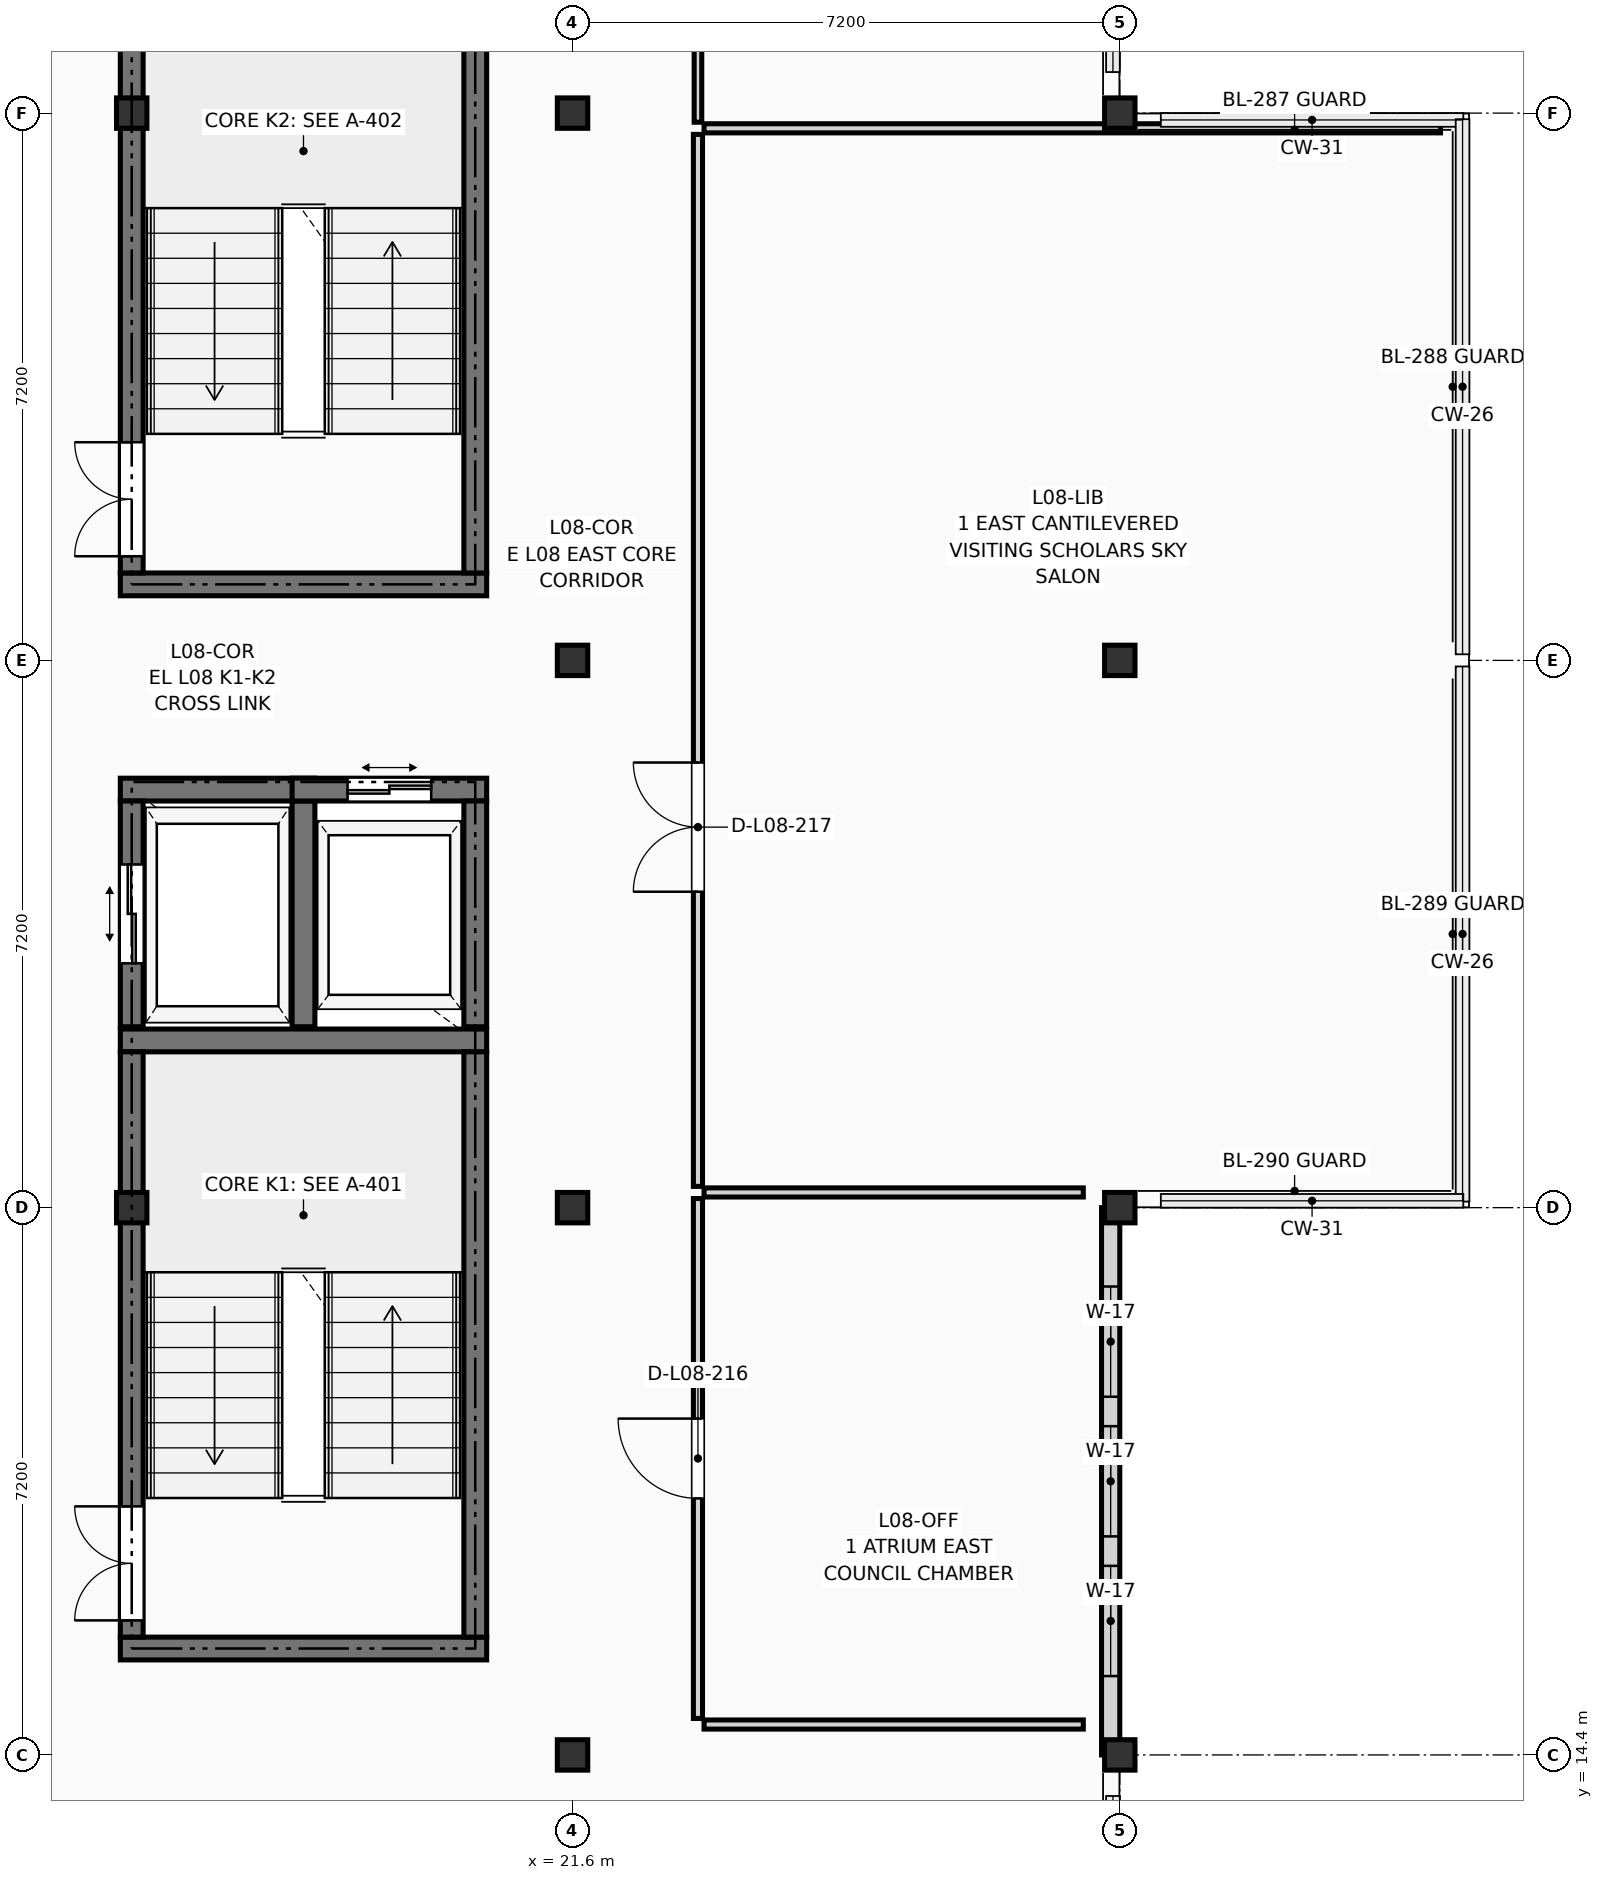
"""IFC4 building model, lengths in metres.
Left out: names, types, materials, properties, quantities, classifications, styles, units other than length and angle.
Written with IfcOpenShell. Run it as: python <this file> out.ifc"""

import sys

from ifc_helpers import new_model, si_unit, direction, frame, frame_2d, origin, origin_2d, place, context, subcontext, project, spatial, rectangle, extrude, element, fill, save


model = new_model("IFC4")
c1 = context("Model", 3, precision=1e-05, world=origin(), true_north=direction((0.0, 1.0)))
c2 = subcontext(c1, "Body", "Model", "MODEL_VIEW")
j1 = project(units=[si_unit("LENGTHUNIT", "METRE"), si_unit("PLANEANGLEUNIT", "RADIAN")], contexts=[c1])
p1 = place(None, origin())
s1 = spatial("IfcSite", under=j1, at=p1, CompositionType="ELEMENT")
p2 = place(p1, origin())
s2 = spatial("IfcBuilding", under=s1, at=p2, CompositionType="ELEMENT")
p3 = place(p2, frame((0.0, 0.0, 29.7)))
s3 = spatial("IfcBuildingStorey", under=s2, at=p3, CompositionType="ELEMENT", Elevation=29.7)
for number, where, z_axis, x_axis in (
    (1, (15.8, 21.6, 0.0), (0.0, 0.0, 1.0), (1.0, 0.0, 0.0)),
    (2, (15.8, 36.0, 0.0), (0.0, 0.0, 1.0), (1.0, 0.0, 0.0)),
    (3, (21.6, 14.4, 0.0), (0.0, 0.0, 1.0), (1.0, 0.0, 0.0)),
    (4, (21.6, 21.6, 0.0), (0.0, 0.0, 1.0), (1.0, 0.0, 0.0)),
    (5, (21.6, 28.8, 0.0), (0.0, 0.0, 1.0), (1.0, 0.0, 0.0)),
    (6, (21.6, 36.0, 0.0), (0.0, 0.0, 1.0), (1.0, 0.0, 0.0)),
    (7, (28.8, 14.4, 0.0), (0.0, 0.0, 1.0), (1.0, 0.0, 0.0)),
    (8, (28.8, 21.6, 0.0), (0.0, 0.0, 1.0), (1.0, 0.0, 0.0)),
    (9, (28.8, 28.8, 0.0), (0.0, 0.0, 1.0), (1.0, 0.0, 0.0)),
    (10, (28.8, 36.0, 0.0), (0.0, 0.0, 1.0), (1.0, 0.0, 0.0)),
):
    element("IfcColumn", number, at=place(p3, frame(where, z_axis=z_axis, x_axis=x_axis)), inside=s3, PredefinedType="COLUMN", context=c2, shape_type="SweptSolid", body=[
        extrude(rectangle(XDim=0.4, YDim=0.4, at=origin_2d()), origin(), (0.0, 0.0, 1.0), 3.6),
    ])
p4 = place(p3, frame((28.68, 14.4, 0.0), z_axis=(0.0, 0.0, 1.0), x_axis=(0.0, 1.0, 0.0)))
e11 = element("IfcWall", 11, at=p4, inside=s3, PredefinedType="SOLIDWALL", context=c2, shape_type="SweptSolid", body=[
    extrude(rectangle(XDim=7.2, YDim=0.24, at=frame_2d((3.6, 0.0))), origin(), (0.0, 0.0, 1.0), 2.85),
])
p5 = place(p4, frame((1.038, 0.0, 0.18)))
e12 = element("IfcOpeningElement", 12, at=p5, cuts=e11, PredefinedType="OPENING", context=c2, shape_type="SweptSolid", body=[
    extrude(rectangle(XDim=1.45, YDim=2.5, at=frame_2d((0.725, 1.25))), frame((0.0, 0.132, 0.0), z_axis=(0.0, -1.0, 0.0), x_axis=(1.0, 0.0, 0.0)), (0.0, 0.0, 1.0), 0.264),
])
p6 = place(p4, frame((2.875, 0.0, 0.18)))
e13 = element("IfcOpeningElement", 13, at=p6, cuts=e11, PredefinedType="OPENING", context=c2, shape_type="SweptSolid", body=[
    extrude(rectangle(XDim=1.45, YDim=2.5, at=frame_2d((0.725, 1.25))), frame((0.0, 0.132, 0.0), z_axis=(0.0, -1.0, 0.0), x_axis=(1.0, 0.0, 0.0)), (0.0, 0.0, 1.0), 0.264),
])
p7 = place(p4, frame((4.712, 0.0, 0.18)))
e14 = element("IfcOpeningElement", 14, at=p7, cuts=e11, PredefinedType="OPENING", context=c2, shape_type="SweptSolid", body=[
    extrude(rectangle(XDim=1.45, YDim=2.5, at=frame_2d((0.725, 1.25))), frame((0.0, 0.132, 0.0), z_axis=(0.0, -1.0, 0.0), x_axis=(1.0, 0.0, 0.0)), (0.0, 0.0, 1.0), 0.264),
])
for number, where, z_axis, x_axis in (
    (15, (15.65, 15.8, 0.0), (0.0, 0.0, 1.0), (1.0, 0.0, 0.0)),
    (16, (15.65, 23.8, 0.0), (0.0, 0.0, 1.0), (1.0, 0.0, 0.0)),
):
    element("IfcWall", number, at=place(p3, frame(where, z_axis=z_axis, x_axis=x_axis)), inside=s3, PredefinedType="SHEAR", context=c2, shape_type="SweptSolid", body=[
        extrude(rectangle(XDim=4.82, YDim=0.3, at=frame_2d((2.41, 0.0))), origin(), (0.0, 0.0, 1.0), 3.4),
    ])
p8 = place(p3, frame((15.8, 15.95, 0.0), z_axis=(0.0, 0.0, 1.0), x_axis=(0.0, 1.0, 0.0)))
e17 = element("IfcWall", 17, at=p8, inside=s3, PredefinedType="SHEAR", context=c2, shape_type="SweptSolid", body=[
    extrude(rectangle(XDim=7.7, YDim=0.3, at=frame_2d((3.85, 0.0))), origin(), (0.0, 0.0, 1.0), 3.4),
])
p9 = place(p8, frame((0.22, 0.0, 0.0)))
e18 = element("IfcOpeningElement", 18, at=p9, cuts=e17, PredefinedType="OPENING", context=c2, shape_type="SweptSolid", body=[
    extrude(rectangle(XDim=1.5, YDim=2.2, at=frame_2d((0.75, 1.1))), frame((0.0, 0.162, 0.0), z_axis=(0.0, -1.0, 0.0), x_axis=(1.0, 0.0, 0.0)), (0.0, 0.0, 1.0), 0.324),
])
p10 = place(p3, frame((20.32, 15.95, 0.0), z_axis=(0.0, 0.0, 1.0), x_axis=(0.0, 1.0, 0.0)))
e19 = element("IfcWall", 19, at=p10, inside=s3, PredefinedType="SHEAR", context=c2, shape_type="SweptSolid", body=[
    extrude(rectangle(XDim=7.7, YDim=0.3, at=frame_2d((3.85, 0.0))), origin(), (0.0, 0.0, 1.0), 3.4),
])
p11 = place(p3, frame((15.65, 29.8, 0.0), z_axis=(0.0, 0.0, 1.0), x_axis=(1.0, 0.0, 0.0)))
e20 = element("IfcWall", 20, at=p11, inside=s3, PredefinedType="SHEAR", context=c2, shape_type="SweptSolid", body=[
    extrude(rectangle(XDim=4.82, YDim=0.3, at=frame_2d((2.41, 0.0))), origin(), (0.0, 0.0, 1.0), 3.4),
])
p12 = place(p3, frame((15.8, 29.95, 0.0), z_axis=(0.0, 0.0, 1.0), x_axis=(0.0, 1.0, 0.0)))
e21 = element("IfcWall", 21, at=p12, inside=s3, PredefinedType="SHEAR", context=c2, shape_type="SweptSolid", body=[
    extrude(rectangle(XDim=7.7, YDim=0.3, at=frame_2d((3.85, 0.0))), origin(), (0.0, 0.0, 1.0), 3.4),
])
p13 = place(p12, frame((0.22, 0.0, 0.0)))
e22 = element("IfcOpeningElement", 22, at=p13, cuts=e21, PredefinedType="OPENING", context=c2, shape_type="SweptSolid", body=[
    extrude(rectangle(XDim=1.5, YDim=2.2, at=frame_2d((0.75, 1.1))), frame((0.0, 0.162, 0.0), z_axis=(0.0, -1.0, 0.0), x_axis=(1.0, 0.0, 0.0)), (0.0, 0.0, 1.0), 0.324),
])
p14 = place(p3, frame((20.32, 29.95, 0.0), z_axis=(0.0, 0.0, 1.0), x_axis=(0.0, 1.0, 0.0)))
e23 = element("IfcWall", 23, at=p14, inside=s3, PredefinedType="SHEAR", context=c2, shape_type="SweptSolid", body=[
    extrude(rectangle(XDim=7.7, YDim=0.3, at=frame_2d((3.85, 0.0))), origin(), (0.0, 0.0, 1.0), 3.4),
])
p15 = place(p3, frame((15.65, 27.1, 0.0), z_axis=(0.0, 0.0, 1.0), x_axis=(1.0, 0.0, 0.0)))
e24 = element("IfcWall", 24, at=p15, inside=s3, PredefinedType="SHEAR", context=c2, shape_type="SweptSolid", body=[
    extrude(rectangle(XDim=2.56, YDim=0.3, at=frame_2d((1.28, 0.0))), origin(), (0.0, 0.0, 1.0), 3.4),
])
p16 = place(p3, frame((15.8, 23.98, 0.0), z_axis=(0.0, 0.0, 1.0), x_axis=(0.0, 1.0, 0.0)))
e25 = element("IfcWall", 25, at=p16, inside=s3, PredefinedType="SHEAR", context=c2, shape_type="SweptSolid", body=[
    extrude(rectangle(XDim=2.97, YDim=0.3, at=frame_2d((1.485, 0.0))), origin(), (0.0, 0.0, 1.0), 3.4),
])
p17 = place(p16, frame((0.835, 0.0, 0.0)))
e26 = element("IfcOpeningElement", 26, at=p17, cuts=e25, PredefinedType="OPENING", context=c2, shape_type="SweptSolid", body=[
    extrude(rectangle(XDim=1.3, YDim=2.25, at=frame_2d((0.65, 1.125))), frame((0.0, 0.162, 0.0), z_axis=(0.0, -1.0, 0.0), x_axis=(1.0, 0.0, 0.0)), (0.0, 0.0, 1.0), 0.324),
])
p18 = place(p3, frame((18.06, 23.98, 0.0), z_axis=(0.0, 0.0, 1.0), x_axis=(0.0, 1.0, 0.0)))
e27 = element("IfcWall", 27, at=p18, inside=s3, PredefinedType="SHEAR", context=c2, shape_type="SweptSolid", body=[
    extrude(rectangle(XDim=2.97, YDim=0.3, at=frame_2d((1.485, 0.0))), origin(), (0.0, 0.0, 1.0), 3.4),
])
p19 = place(p3, frame((17.91, 27.1, 0.0), z_axis=(0.0, 0.0, 1.0), x_axis=(1.0, 0.0, 0.0)))
e28 = element("IfcWall", 28, at=p19, inside=s3, PredefinedType="SHEAR", context=c2, shape_type="SweptSolid", body=[
    extrude(rectangle(XDim=2.56, YDim=0.3, at=frame_2d((1.28, 0.0))), origin(), (0.0, 0.0, 1.0), 3.4),
])
p20 = place(p19, frame((0.73, 0.0, 0.0)))
e29 = element("IfcOpeningElement", 29, at=p20, cuts=e28, PredefinedType="OPENING", context=c2, shape_type="SweptSolid", body=[
    extrude(rectangle(XDim=1.1, YDim=2.2, at=frame_2d((0.55, 1.1))), frame((0.0, 0.162, 0.0), z_axis=(0.0, -1.0, 0.0), x_axis=(1.0, 0.0, 0.0)), (0.0, 0.0, 1.0), 0.324),
])
p21 = place(p3, frame((20.32, 23.98, 0.0), z_axis=(0.0, 0.0, 1.0), x_axis=(0.0, 1.0, 0.0)))
e30 = element("IfcWall", 30, at=p21, inside=s3, PredefinedType="SHEAR", context=c2, shape_type="SweptSolid", body=[
    extrude(rectangle(XDim=2.97, YDim=0.3, at=frame_2d((1.485, 0.0))), origin(), (0.0, 0.0, 1.0), 3.4),
])
p22 = place(p3, frame((23.25, 14.88, 0.0), z_axis=(0.0, 0.0, 1.0), x_axis=(0.0, 1.0, 0.0)))
e31 = element("IfcWall", 31, at=p22, inside=s3, PredefinedType="PARTITIONING", context=c2, shape_type="SweptSolid", body=[
    extrude(rectangle(XDim=6.84, YDim=0.12, at=frame_2d((3.42, 0.0))), origin(), (0.0, 0.0, 1.0), 3.385),
])
p23 = place(p22, frame((2.895, 0.0, 0.0)))
e32 = element("IfcOpeningElement", 32, at=p23, cuts=e31, PredefinedType="OPENING", context=c2, shape_type="SweptSolid", body=[
    extrude(rectangle(XDim=1.05, YDim=2.18, at=frame_2d((0.525, 1.09))), frame((0.0, 0.072, 0.0), z_axis=(0.0, -1.0, 0.0), x_axis=(1.0, 0.0, 0.0)), (0.0, 0.0, 1.0), 0.144),
])
p24 = place(p3, frame((23.33, 14.8, 0.0), z_axis=(0.0, 0.0, 1.0), x_axis=(1.0, 0.0, 0.0)))
e33 = element("IfcWall", 33, at=p24, inside=s3, PredefinedType="PARTITIONING", context=c2, shape_type="SweptSolid", body=[
    extrude(rectangle(XDim=4.99, YDim=0.12, at=frame_2d((2.495, 0.0))), origin(), (0.0, 0.0, 1.0), 3.385),
])
p25 = place(p3, frame((23.33, 21.8, 0.0), z_axis=(0.0, 0.0, 1.0), x_axis=(1.0, 0.0, 0.0)))
e34 = element("IfcWall", 34, at=p25, inside=s3, PredefinedType="PARTITIONING", context=c2, shape_type="SweptSolid", body=[
    extrude(rectangle(XDim=4.99, YDim=0.12, at=frame_2d((2.495, 0.0))), origin(), (0.0, 0.0, 1.0), 2.701),
])
p26 = place(p3, frame((23.25, 21.88, 0.0), z_axis=(0.0, 0.0, 1.0), x_axis=(0.0, 1.0, 0.0)))
e35 = element("IfcWall", 35, at=p26, inside=s3, PredefinedType="PARTITIONING", context=c2, shape_type="SweptSolid", body=[
    extrude(rectangle(XDim=13.84, YDim=0.12, at=frame_2d((6.92, 0.0))), origin(), (0.0, 0.0, 1.0), 3.385),
])
p27 = place(p26, frame((3.876, 0.0, 0.0)))
e36 = element("IfcOpeningElement", 36, at=p27, cuts=e35, PredefinedType="OPENING", context=c2, shape_type="SweptSolid", body=[
    extrude(rectangle(XDim=1.7, YDim=2.28, at=frame_2d((0.85, 1.14))), frame((0.0, 0.072, 0.0), z_axis=(0.0, -1.0, 0.0), x_axis=(1.0, 0.0, 0.0)), (0.0, 0.0, 1.0), 0.144),
])
p28 = place(p3, frame((23.33, 35.8, 0.0), z_axis=(0.0, 0.0, 1.0), x_axis=(1.0, 0.0, 0.0)))
e37 = element("IfcWall", 37, at=p28, inside=s3, PredefinedType="PARTITIONING", context=c2, shape_type="SweptSolid", body=[
    extrude(rectangle(XDim=9.69, YDim=0.12, at=frame_2d((4.845, 0.0))), origin(), (0.0, 0.0, 1.0), 2.701),
])
p29 = place(p3, frame((23.25, 35.88, 0.0), z_axis=(0.0, 0.0, 1.0), x_axis=(0.0, 1.0, 0.0)))
e38 = element("IfcWall", 38, at=p29, inside=s3, PredefinedType="PARTITIONING", context=c2, shape_type="SweptSolid", body=[
    extrude(rectangle(XDim=6.44, YDim=0.1, at=frame_2d((3.22, 0.0))), origin(), (0.0, 0.0, 1.0), 3.385),
])
p30 = place(p29, frame((2.77, 0.0, 0.0)))
e39 = element("IfcOpeningElement", 39, at=p30, cuts=e38, PredefinedType="OPENING", context=c2, shape_type="SweptSolid", body=[
    extrude(rectangle(XDim=0.9, YDim=2.1, at=frame_2d((0.45, 1.05))), frame((0.0, 0.062, 0.0), z_axis=(0.0, -1.0, 0.0), x_axis=(1.0, 0.0, 0.0)), (0.0, 0.0, 1.0), 0.124),
])
p31 = place(p5, origin())
e40 = element("IfcWindow", 40, at=p31, inside=s3, PartitioningType="SINGLE_PANEL", PredefinedType="WINDOW", context=c2, shape_type="SweptSolid", body=[
    extrude(rectangle(XDim=1.45, YDim=2.5, at=frame_2d((0.725, 1.25))), frame((0.0, 0.03, 0.0), z_axis=(0.0, -1.0, 0.0), x_axis=(1.0, 0.0, 0.0)), (0.0, 0.0, 1.0), 0.06),
])
fill(e12, e40)
p32 = place(p6, origin())
e41 = element("IfcWindow", 41, at=p32, inside=s3, PartitioningType="SINGLE_PANEL", PredefinedType="WINDOW", context=c2, shape_type="SweptSolid", body=[
    extrude(rectangle(XDim=1.45, YDim=2.5, at=frame_2d((0.725, 1.25))), frame((0.0, 0.03, 0.0), z_axis=(0.0, -1.0, 0.0), x_axis=(1.0, 0.0, 0.0)), (0.0, 0.0, 1.0), 0.06),
])
fill(e13, e41)
p33 = place(p7, origin())
e42 = element("IfcWindow", 42, at=p33, inside=s3, PartitioningType="SINGLE_PANEL", PredefinedType="WINDOW", context=c2, shape_type="SweptSolid", body=[
    extrude(rectangle(XDim=1.45, YDim=2.5, at=frame_2d((0.725, 1.25))), frame((0.0, 0.03, 0.0), z_axis=(0.0, -1.0, 0.0), x_axis=(1.0, 0.0, 0.0)), (0.0, 0.0, 1.0), 0.06),
])
fill(e14, e42)
p34 = place(p9, origin())
e43 = element("IfcDoor", 43, at=p34, inside=s3, OperationType="DOUBLE_DOOR_SINGLE_SWING", PredefinedType="DOOR", context=c2, shape_type="SweptSolid", body=[
    extrude(rectangle(XDim=1.5, YDim=2.2, at=frame_2d((0.75, 1.1))), frame((0.0, 0.025, 0.0), z_axis=(0.0, -1.0, 0.0), x_axis=(1.0, 0.0, 0.0)), (0.0, 0.0, 1.0), 0.05),
])
fill(e18, e43)
p35 = place(p13, origin())
e44 = element("IfcDoor", 44, at=p35, inside=s3, OperationType="DOUBLE_DOOR_SINGLE_SWING", PredefinedType="DOOR", context=c2, shape_type="SweptSolid", body=[
    extrude(rectangle(XDim=1.5, YDim=2.2, at=frame_2d((0.75, 1.1))), frame((0.0, 0.025, 0.0), z_axis=(0.0, -1.0, 0.0), x_axis=(1.0, 0.0, 0.0)), (0.0, 0.0, 1.0), 0.05),
])
fill(e22, e44)
p36 = place(p17, origin())
e45 = element("IfcDoor", 45, at=p36, inside=s3, OperationType="DOUBLE_DOOR_SLIDING", PredefinedType="DOOR", context=c2, shape_type="SweptSolid", body=[
    extrude(rectangle(XDim=1.3, YDim=2.25, at=frame_2d((0.65, 1.125))), frame((0.0, 0.025, 0.0), z_axis=(0.0, -1.0, 0.0), x_axis=(1.0, 0.0, 0.0)), (0.0, 0.0, 1.0), 0.05),
])
fill(e26, e45)
p37 = place(p20, origin())
e46 = element("IfcDoor", 46, at=p37, inside=s3, OperationType="DOUBLE_DOOR_SLIDING", PredefinedType="DOOR", context=c2, shape_type="SweptSolid", body=[
    extrude(rectangle(XDim=1.1, YDim=2.2, at=frame_2d((0.55, 1.1))), frame((0.0, 0.025, 0.0), z_axis=(0.0, -1.0, 0.0), x_axis=(1.0, 0.0, 0.0)), (0.0, 0.0, 1.0), 0.05),
])
fill(e29, e46)
p38 = place(p23, origin())
e47 = element("IfcDoor", 47, at=p38, inside=s3, OperationType="SINGLE_SWING_RIGHT", PredefinedType="DOOR", context=c2, shape_type="SweptSolid", body=[
    extrude(rectangle(XDim=1.05, YDim=2.18, at=frame_2d((0.525, 1.09))), frame((0.0, 0.025, 0.0), z_axis=(0.0, -1.0, 0.0), x_axis=(1.0, 0.0, 0.0)), (0.0, 0.0, 1.0), 0.05),
])
fill(e32, e47)
p39 = place(p27, origin())
e48 = element("IfcDoor", 48, at=p39, inside=s3, OperationType="DOUBLE_DOOR_SINGLE_SWING", PredefinedType="DOOR", context=c2, shape_type="SweptSolid", body=[
    extrude(rectangle(XDim=1.7, YDim=2.28, at=frame_2d((0.85, 1.14))), frame((0.0, 0.025, 0.0), z_axis=(0.0, -1.0, 0.0), x_axis=(1.0, 0.0, 0.0)), (0.0, 0.0, 1.0), 0.05),
])
fill(e36, e48)
save(model, sys.argv[1])
